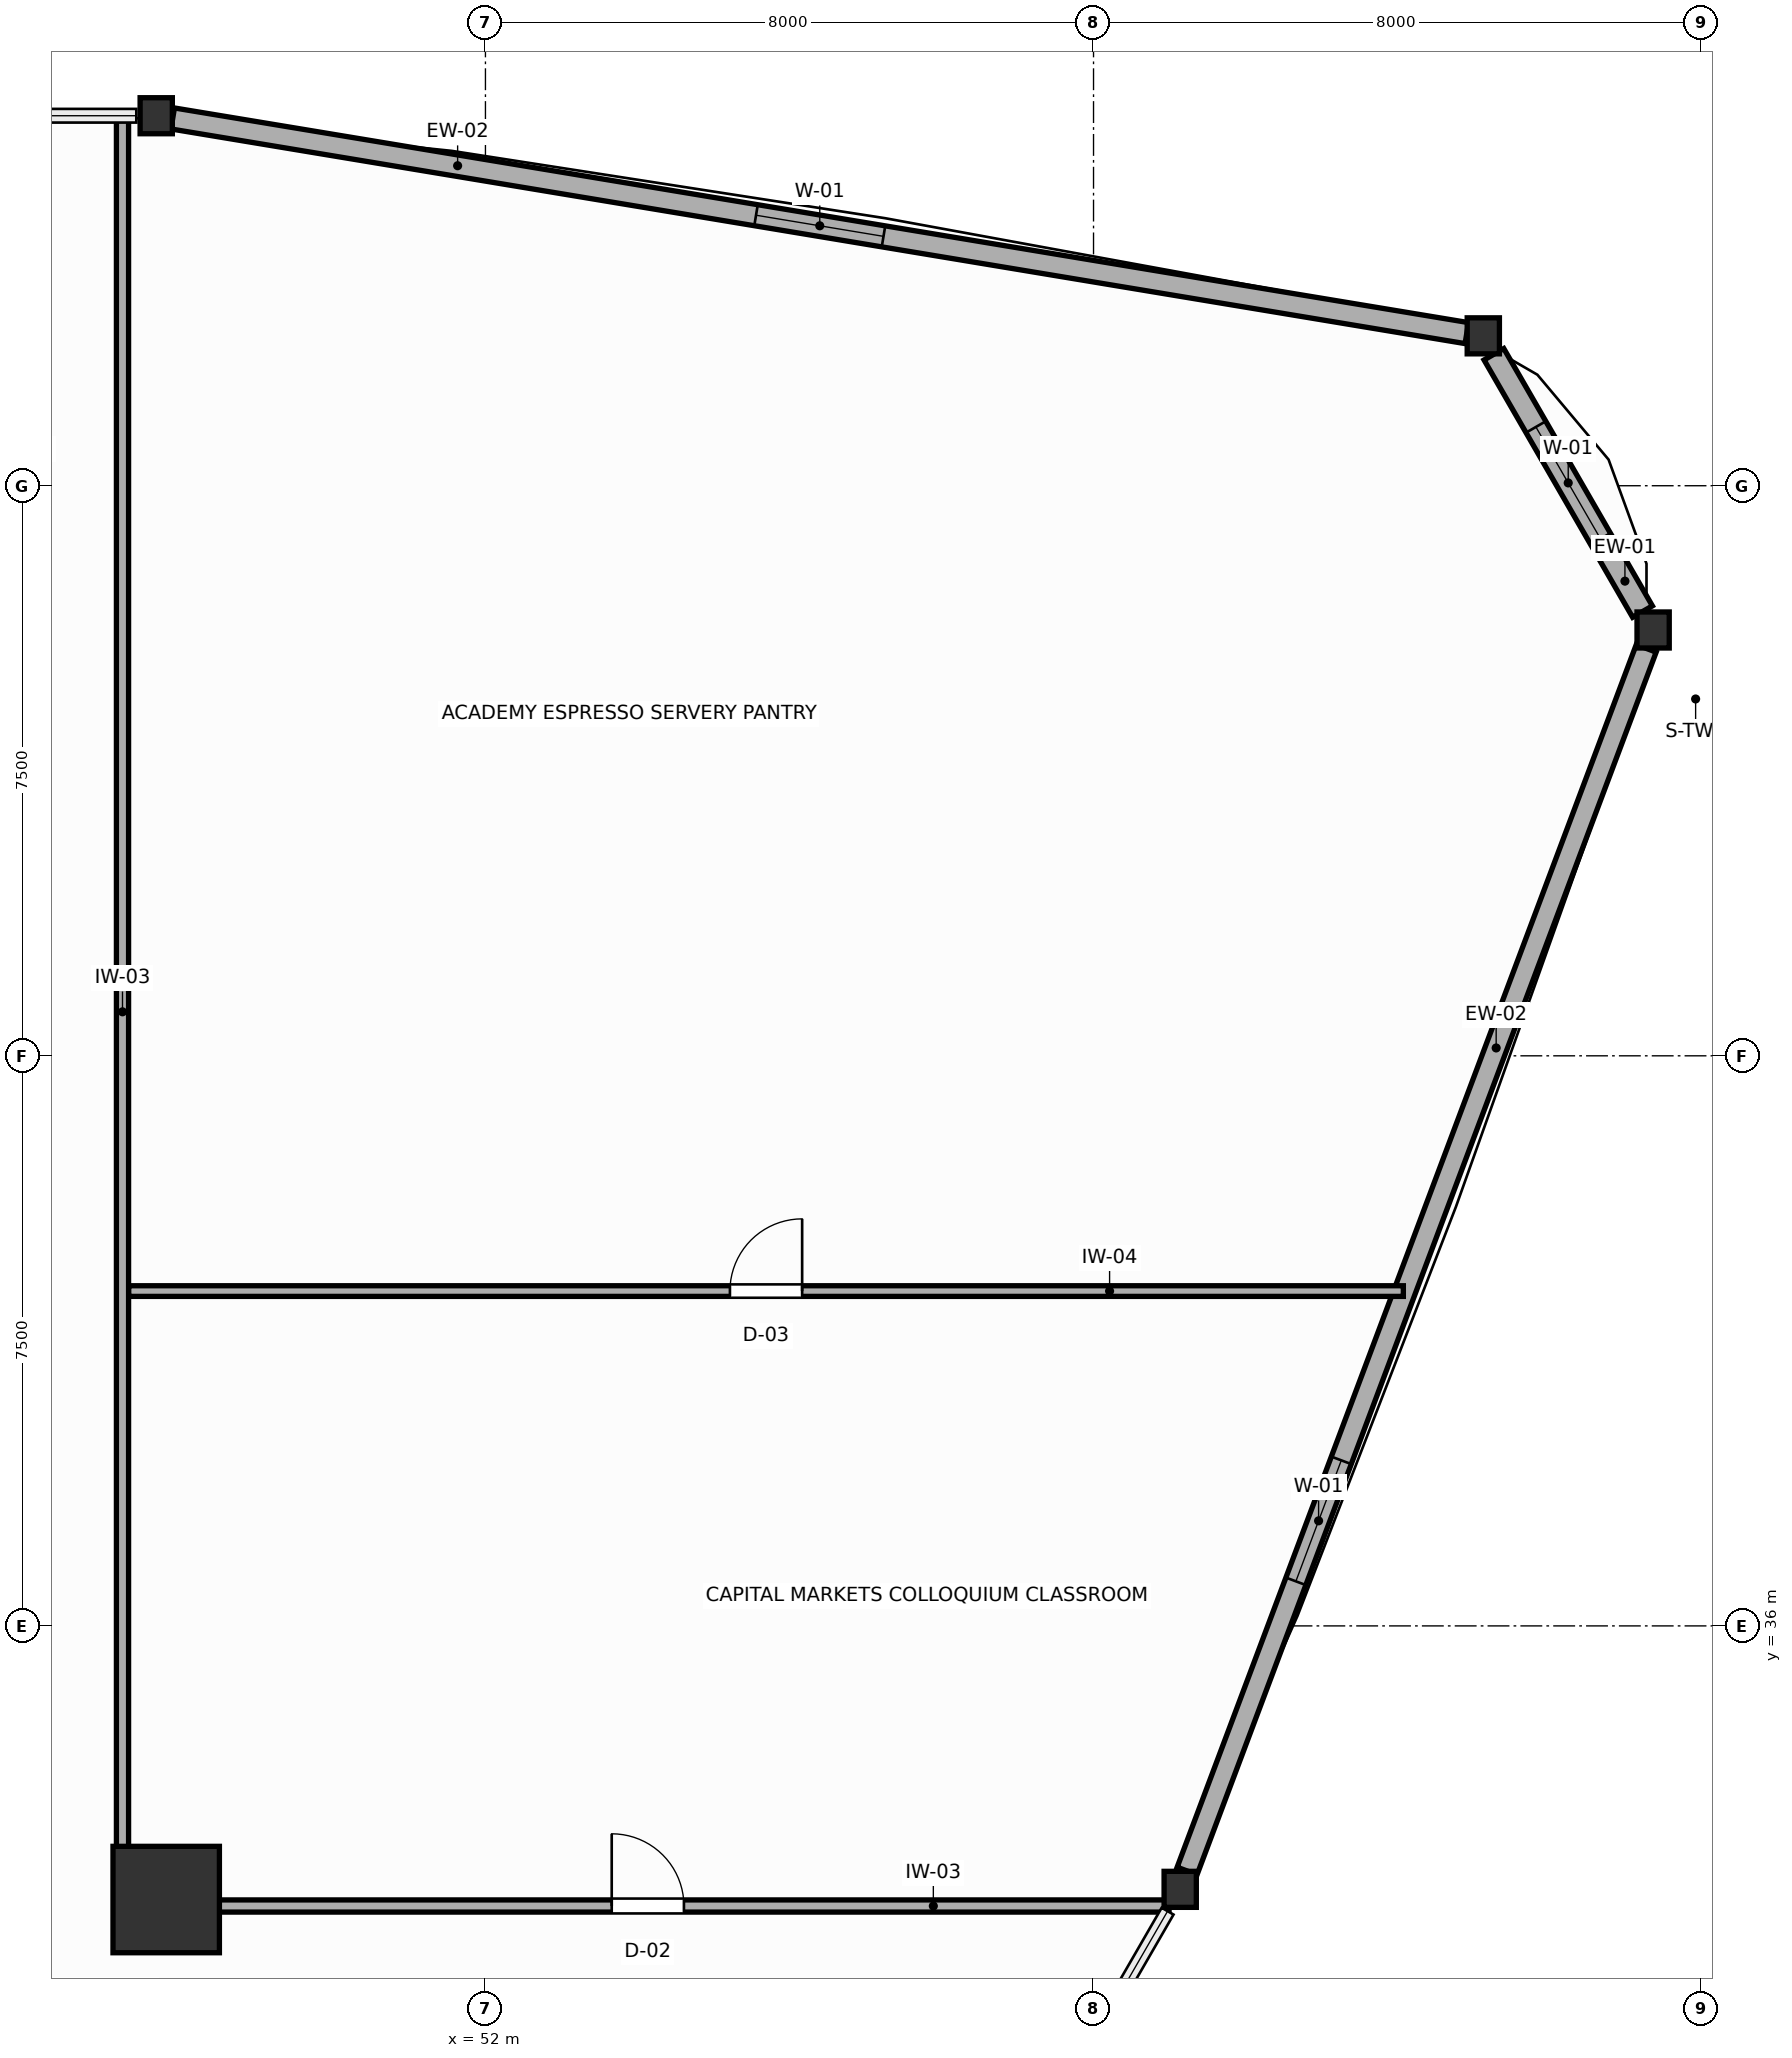
"""IFC4 building model, lengths in metres.
Left out: names, types, materials, properties, quantities, classifications, styles, units other than length and angle.
Written with IfcOpenShell. Run it as: python <this file> out.ifc"""

import sys

from ifc_helpers import new_model, si_unit, direction, frame, frame_2d, origin, origin_2d, place, context, subcontext, project, spatial, rectangle, i_section, extrude, source, transform, mapped, element, fill, save


model = new_model("IFC4")
c1 = context("Model", 3, precision=1e-05, world=origin(), true_north=direction((0.0, 1.0)))
c2 = subcontext(c1, "Body", "Model", "MODEL_VIEW")
j1 = project(units=[si_unit("LENGTHUNIT", "METRE"), si_unit("PLANEANGLEUNIT", "RADIAN")], contexts=[c1])
p1 = place(None, origin())
s1 = spatial("IfcSite", under=j1, at=p1, CompositionType="ELEMENT")
p2 = place(p1, origin())
s2 = spatial("IfcBuilding", under=s1, at=p2, CompositionType="ELEMENT")
p3 = place(p2, frame((0.0, 0.0, 75.6)))
s3 = spatial("IfcBuildingStorey", under=s2, at=p3, CompositionType="ELEMENT", Elevation=75.6)
m1 = source(origin(), c2, "Body", "SweptSolid", [
    extrude(rectangle(XDim=1.4, YDim=1.4, at=origin_2d()), origin(), (0.0, 0.0, 1.0), 3.9),
])
p4 = place(p3, frame((47.8, 32.4, 0.0), z_axis=(0.0, 0.0, 1.0), x_axis=(1.0, 0.0, 0.0)))
e1 = element("IfcColumn", 1, at=p4, inside=s3, PredefinedType="COLUMN", context=c2, shape_type="MappedRepresentation", body=[
    mapped(m1, transform((0.0, 0.0, 0.0), scale=1.0)),
])
m2 = source(origin(), c2, "Body", "SweptSolid", [
    extrude(i_section(OverallWidth=0.424, OverallDepth=0.474, WebThickness=0.045, FlangeThickness=0.072, FilletRadius=0.015, at=origin_2d()), origin(), (0.0, 0.0, 1.0), 3.9),
])
for number, where, z_axis, x_axis in (
    (2, (67.362, 49.102, 0.0), (0.0, 0.0, 1.0), (1.0, 0.0, 0.0)),
    (3, (65.128, 52.972, 0.0), (0.0, 0.0, 1.0), (1.0, 0.0, 0.0)),
    (4, (47.669, 55.868, 0.0), (0.0, 0.0, 1.0), (1.0, 0.0, 0.0)),
    (5, (61.14, 32.534, 0.0), (0.0, 0.0, 1.0), (1.0, 0.0, 0.0)),
):
    element("IfcColumn", number, at=place(p3, frame(where, z_axis=z_axis, x_axis=x_axis)), inside=s3, PredefinedType="COLUMN", context=c2, shape_type="MappedRepresentation", body=[
        mapped(m2, transform((0.0, 0.0, 0.0), scale=1.0)),
    ])
p5 = place(p3, frame((67.222, 49.344, 0.0), z_axis=(0.0, 0.0, 1.0), x_axis=(-0.500014353419, 0.866017116675, 0.0)))
e6 = element("IfcWall", 6, at=p5, inside=s3, PredefinedType="SOLIDWALL", context=c2, shape_type="SweptSolid", body=[
    extrude(rectangle(XDim=3.91, YDim=0.3, at=frame_2d((1.955, 0.0))), origin(), (0.0, 0.0, 1.0), 3.23),
])
p6 = place(p5, frame((1.105, 0.0, 0.75)))
e7 = element("IfcOpeningElement", 7, at=p6, cuts=e6, PredefinedType="OPENING", context=c2, shape_type="SweptSolid", body=[
    extrude(rectangle(XDim=1.7, YDim=1.75, at=frame_2d((0.85, 0.875))), frame((0.0, 0.16, 0.0), z_axis=(0.0, -1.0, 0.0), x_axis=(1.0, 0.0, 0.0)), (0.0, 0.0, 1.0), 0.32),
])
p7 = place(p3, frame((64.911, 53.008, 0.0), z_axis=(0.0, 0.0, 1.0), x_axis=(-0.986523232029, 0.163621247604, 0.0)))
e8 = element("IfcWall", 8, at=p7, inside=s3, PredefinedType="SOLIDWALL", context=c2, shape_type="SweptSolid", body=[
    extrude(rectangle(XDim=17.258, YDim=0.28, at=frame_2d((8.629, 0.0))), origin(), (0.0, 0.0, 1.0), 3.23),
])
p8 = place(p7, frame((7.779, 0.0, 0.75)))
e9 = element("IfcOpeningElement", 9, at=p8, cuts=e8, PredefinedType="OPENING", context=c2, shape_type="SweptSolid", body=[
    extrude(rectangle(XDim=1.7, YDim=1.75, at=frame_2d((0.85, 0.875))), frame((0.0, 0.15, 0.0), z_axis=(0.0, -1.0, 0.0), x_axis=(1.0, 0.0, 0.0)), (0.0, 0.0, 1.0), 0.3),
])
p9 = place(p3, frame((61.231, 32.776, 0.0), z_axis=(0.0, 0.0, 1.0), x_axis=(0.351559441404, 0.936165561832, 0.0)))
e10 = element("IfcWall", 10, at=p9, inside=s3, PredefinedType="SOLIDWALL", context=c2, shape_type="SweptSolid", body=[
    extrude(rectangle(XDim=17.181, YDim=0.28, at=frame_2d((8.59, 0.0))), origin(), (0.0, 0.0, 1.0), 3.23),
])
p10 = place(p9, frame((4.07, 0.0, 0.75)))
e11 = element("IfcOpeningElement", 11, at=p10, cuts=e10, PredefinedType="OPENING", context=c2, shape_type="SweptSolid", body=[
    extrude(rectangle(XDim=1.7, YDim=1.75, at=frame_2d((0.85, 0.875))), frame((0.0, 0.15, 0.0), z_axis=(0.0, -1.0, 0.0), x_axis=(1.0, 0.0, 0.0)), (0.0, 0.0, 1.0), 0.3),
])
p11 = place(p3, frame((47.225, 32.31, 0.0), z_axis=(0.0, 0.0, 1.0), x_axis=(0.0, 1.0, 0.0)))
e12 = element("IfcWall", 12, at=p11, inside=s3, PredefinedType="PARTITIONING", context=c2, shape_type="SweptSolid", body=[
    extrude(rectangle(XDim=23.538, YDim=0.16, at=frame_2d((11.769, 0.0))), origin(), (0.0, 0.0, 1.0), 3.18),
])
p12 = place(p3, frame((47.307, 32.315, 0.0), z_axis=(0.0, 0.0, 1.0), x_axis=(1.0, 0.0, 0.0)))
e13 = element("IfcWall", 13, at=p12, inside=s3, PredefinedType="PARTITIONING", context=c2, shape_type="SweptSolid", body=[
    extrude(rectangle(XDim=13.687, YDim=0.16, at=frame_2d((6.843, 0.0))), origin(), (0.0, 0.0, 1.0), 3.18),
])
p13 = place(p12, frame((6.354, 0.0, 0.0)))
e14 = element("IfcOpeningElement", 14, at=p13, cuts=e13, PredefinedType="OPENING", context=c2, shape_type="SweptSolid", body=[
    extrude(rectangle(XDim=0.95, YDim=2.05, at=frame_2d((0.475, 1.025))), frame((0.0, 0.09, 0.0), z_axis=(0.0, -1.0, 0.0), x_axis=(1.0, 0.0, 0.0)), (0.0, 0.0, 1.0), 0.18),
])
p14 = place(p3, frame((47.307, 40.405, 0.0), z_axis=(0.0, 0.0, 1.0), x_axis=(1.0, 0.0, 0.0)))
e15 = element("IfcWall", 15, at=p14, inside=s3, PredefinedType="PARTITIONING", context=c2, shape_type="SweptSolid", body=[
    extrude(rectangle(XDim=16.769, YDim=0.14, at=frame_2d((8.385, 0.0))), origin(), (0.0, 0.0, 1.0), 3.68),
])
p15 = place(p14, frame((7.909, 0.0, 0.0)))
e16 = element("IfcOpeningElement", 16, at=p15, cuts=e15, PredefinedType="OPENING", context=c2, shape_type="SweptSolid", body=[
    extrude(rectangle(XDim=0.95, YDim=2.05, at=frame_2d((0.475, 1.025))), frame((0.0, 0.08, 0.0), z_axis=(0.0, -1.0, 0.0), x_axis=(1.0, 0.0, 0.0)), (0.0, 0.0, 1.0), 0.16),
])
p16 = place(p6, origin())
e17 = element("IfcWindow", 17, at=p16, inside=s3, PartitioningType="SINGLE_PANEL", PredefinedType="WINDOW", context=c2, shape_type="SweptSolid", body=[
    extrude(rectangle(XDim=1.7, YDim=1.75, at=frame_2d((0.85, 0.875))), frame((0.0, 0.03, 0.0), z_axis=(0.0, -1.0, 0.0), x_axis=(1.0, 0.0, 0.0)), (0.0, 0.0, 1.0), 0.06),
])
fill(e7, e17)
p17 = place(p8, origin())
e18 = element("IfcWindow", 18, at=p17, inside=s3, PartitioningType="SINGLE_PANEL", PredefinedType="WINDOW", context=c2, shape_type="SweptSolid", body=[
    extrude(rectangle(XDim=1.7, YDim=1.75, at=frame_2d((0.85, 0.875))), frame((0.0, 0.03, 0.0), z_axis=(0.0, -1.0, 0.0), x_axis=(1.0, 0.0, 0.0)), (0.0, 0.0, 1.0), 0.06),
])
fill(e9, e18)
p18 = place(p10, origin())
e19 = element("IfcWindow", 19, at=p18, inside=s3, PartitioningType="SINGLE_PANEL", PredefinedType="WINDOW", context=c2, shape_type="SweptSolid", body=[
    extrude(rectangle(XDim=1.7, YDim=1.75, at=frame_2d((0.85, 0.875))), frame((0.0, 0.03, 0.0), z_axis=(0.0, -1.0, 0.0), x_axis=(1.0, 0.0, 0.0)), (0.0, 0.0, 1.0), 0.06),
])
fill(e11, e19)
p19 = place(p13, origin())
e20 = element("IfcDoor", 20, at=p19, inside=s3, OperationType="SINGLE_SWING_LEFT", PredefinedType="DOOR", context=c2, shape_type="SweptSolid", body=[
    extrude(rectangle(XDim=0.95, YDim=2.05, at=frame_2d((0.475, 1.025))), frame((0.0, 0.025, 0.0), z_axis=(0.0, -1.0, 0.0), x_axis=(1.0, 0.0, 0.0)), (0.0, 0.0, 1.0), 0.05),
])
fill(e14, e20)
p20 = place(p15, origin())
e21 = element("IfcDoor", 21, at=p20, inside=s3, OperationType="SINGLE_SWING_RIGHT", PredefinedType="DOOR", context=c2, shape_type="SweptSolid", body=[
    extrude(rectangle(XDim=0.95, YDim=2.05, at=frame_2d((0.475, 1.025))), frame((0.0, 0.025, 0.0), z_axis=(0.0, -1.0, 0.0), x_axis=(1.0, 0.0, 0.0)), (0.0, 0.0, 1.0), 0.05),
])
fill(e16, e21)
save(model, sys.argv[1])
